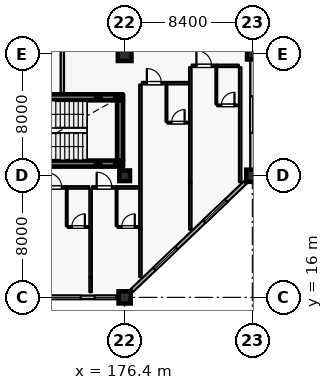
"""IFC4 building model, lengths in metres.
Left out: names, types, materials, properties, quantities, classifications, styles, units other than length and angle.
Written with IfcOpenShell. Run it as: python <this file> out.ifc"""

import sys

from ifc_helpers import new_model, si_unit, direction, frame, frame_2d, origin, origin_2d, place, context, subcontext, project, spatial, rectangle, hollow_rectangle, extrude, element, fill, save


model = new_model("IFC4")
c1 = context("Model", 3, precision=1e-05, world=origin(), true_north=direction((0.0, 1.0)))
c2 = subcontext(c1, "Body", "Model", "MODEL_VIEW")
j1 = project(units=[si_unit("LENGTHUNIT", "METRE"), si_unit("PLANEANGLEUNIT", "RADIAN")], contexts=[c1])
p1 = place(None, origin())
s1 = spatial("IfcSite", under=j1, at=p1, CompositionType="ELEMENT")
p2 = place(p1, origin())
s2 = spatial("IfcBuilding", under=s1, at=p2, CompositionType="ELEMENT")
p3 = place(p2, frame((0.0, 0.0, 16.2)))
s3 = spatial("IfcBuildingStorey", under=s2, at=p3, CompositionType="ELEMENT", Elevation=16.2)
p4 = place(p3, frame((176.4, 16.0, 0.0), z_axis=(0.0, 0.0, 1.0), x_axis=(1.0, 0.0, 0.0)))
e1 = element("IfcColumn", 1, at=p4, inside=s3, PredefinedType="COLUMN", context=c2, shape_type="SweptSolid", body=[
    extrude(rectangle(XDim=0.8, YDim=0.8, at=origin_2d()), origin(), (0.0, 0.0, 1.0), 4.8),
])
p5 = place(p3, frame((176.4, 32.0, 0.0), z_axis=(0.0, 0.0, 1.0), x_axis=(1.0, 0.0, 0.0)))
e2 = element("IfcColumn", 2, at=p5, inside=s3, PredefinedType="COLUMN", context=c2, shape_type="SweptSolid", body=[
    extrude(rectangle(XDim=0.9, YDim=0.9, at=origin_2d()), origin(), (0.0, 0.0, 1.0), 4.8),
])
p6 = place(p3, frame((184.8, 24.0, 0.0), z_axis=(0.0, 0.0, 1.0), x_axis=(1.0, 0.0, 0.0)))
e3 = element("IfcColumn", 3, at=p6, inside=s3, PredefinedType="COLUMN", context=c2, shape_type="SweptSolid", body=[
    extrude(rectangle(XDim=0.8, YDim=0.8, at=origin_2d()), origin(), (0.0, 0.0, 1.0), 4.8),
])
for number, where, z_axis, x_axis in (
    (4, (176.4, 24.0, 0.0), (0.0, 0.0, 1.0), (1.0, 0.0, 0.0)),
    (5, (184.8, 32.0, 0.0), (0.0, 0.0, 1.0), (1.0, 0.0, 0.0)),
):
    element("IfcColumn", number, at=place(p3, frame(where, z_axis=z_axis, x_axis=x_axis)), inside=s3, PredefinedType="COLUMN", context=c2, shape_type="SweptSolid", body=[
        extrude(rectangle(XDim=0.7, YDim=0.7, at=origin_2d()), origin(), (0.0, 0.0, 1.0), 4.8),
    ])
p7 = place(p3, frame((176.0, 16.0, 0.0), z_axis=(0.0, 0.0, 1.0), x_axis=(-1.0, 0.0, 0.0)))
e6 = element("IfcWall", 6, at=p7, inside=s3, PredefinedType="SOLIDWALL", context=c2, shape_type="SweptSolid", body=[
    extrude(rectangle(XDim=7.6, YDim=0.24, at=frame_2d((3.8, 0.0))), origin(), (0.0, 0.0, 1.0), 4.13),
])
p8 = place(p7, frame((0.17, 0.0, 0.8)))
e7 = element("IfcOpeningElement", 7, at=p8, cuts=e6, PredefinedType="OPENING", context=c2, shape_type="SweptSolid", body=[
    extrude(rectangle(XDim=1.4, YDim=1.6, at=frame_2d((0.7, 0.8))), frame((0.0, 0.13, 0.0), z_axis=(0.0, -1.0, 0.0), x_axis=(1.0, 0.0, 0.0)), (0.0, 0.0, 1.0), 0.26),
])
p9 = place(p7, frame((2.48, 0.0, 0.8)))
e8 = element("IfcOpeningElement", 8, at=p9, cuts=e6, PredefinedType="OPENING", context=c2, shape_type="SweptSolid", body=[
    extrude(rectangle(XDim=2.0, YDim=1.75, at=frame_2d((1.0, 0.875))), frame((0.0, 0.13, 0.0), z_axis=(0.0, -1.0, 0.0), x_axis=(1.0, 0.0, 0.0)), (0.0, 0.0, 1.0), 0.26),
])
p10 = place(p7, frame((5.41, 0.0, 0.8)))
e9 = element("IfcOpeningElement", 9, at=p10, cuts=e6, PredefinedType="OPENING", context=c2, shape_type="SweptSolid", body=[
    extrude(rectangle(XDim=2.0, YDim=1.75, at=frame_2d((1.0, 0.875))), frame((0.0, 0.13, 0.0), z_axis=(0.0, -1.0, 0.0), x_axis=(1.0, 0.0, 0.0)), (0.0, 0.0, 1.0), 0.26),
])
p11 = place(p3, frame((184.4, 23.619, 0.0), z_axis=(0.0, 0.0, 1.0), x_axis=(-0.724145676014, -0.689647040094, 0.0)))
e10 = element("IfcWall", 10, at=p11, inside=s3, PredefinedType="SOLIDWALL", context=c2, shape_type="SweptSolid", body=[
    extrude(rectangle(XDim=10.495, YDim=0.24, at=frame_2d((5.248, 0.0))), origin(), (0.0, 0.0, 1.0), 4.13),
])
p12 = place(p11, frame((1.817, 0.0, 0.8)))
e11 = element("IfcOpeningElement", 11, at=p12, cuts=e10, PredefinedType="OPENING", context=c2, shape_type="SweptSolid", body=[
    extrude(rectangle(XDim=2.0, YDim=1.75, at=frame_2d((1.0, 0.875))), frame((0.0, 0.13, 0.0), z_axis=(0.0, -1.0, 0.0), x_axis=(1.0, 0.0, 0.0)), (0.0, 0.0, 1.0), 0.26),
])
p13 = place(p11, frame((6.347, 0.0, 0.8)))
e12 = element("IfcOpeningElement", 12, at=p13, cuts=e10, PredefinedType="OPENING", context=c2, shape_type="SweptSolid", body=[
    extrude(rectangle(XDim=2.0, YDim=1.75, at=frame_2d((1.0, 0.875))), frame((0.0, 0.13, 0.0), z_axis=(0.0, -1.0, 0.0), x_axis=(1.0, 0.0, 0.0)), (0.0, 0.0, 1.0), 0.26),
])
p14 = place(p3, frame((184.8, 31.65, 0.0), z_axis=(0.0, 0.0, 1.0), x_axis=(0.0, -1.0, 0.0)))
e13 = element("IfcWall", 13, at=p14, inside=s3, PredefinedType="SOLIDWALL", context=c2, shape_type="SweptSolid", body=[
    extrude(rectangle(XDim=7.25, YDim=0.28, at=frame_2d((3.625, 0.0))), origin(), (0.0, 0.0, 1.0), 3.9),
])
p15 = place(p14, frame((2.425, 0.0, 0.75)))
e14 = element("IfcOpeningElement", 14, at=p15, cuts=e13, PredefinedType="OPENING", context=c2, shape_type="SweptSolid", body=[
    extrude(rectangle(XDim=2.4, YDim=1.65, at=frame_2d((1.2, 0.825))), frame((0.0, 0.15, 0.0), z_axis=(0.0, -1.0, 0.0), x_axis=(1.0, 0.0, 0.0)), (0.0, 0.0, 1.0), 0.3),
])
p16 = place(p3, frame((168.1, 24.8, 0.0), z_axis=(0.0, 0.0, 1.0), x_axis=(1.0, 0.0, 0.0)))
e15 = element("IfcWall", 15, at=p16, inside=s3, PredefinedType="SHEAR", context=c2, shape_type="SweptSolid", body=[
    extrude(rectangle(XDim=8.2, YDim=0.4, at=frame_2d((4.1, 0.0))), origin(), (0.0, 0.0, 1.0), 4.535),
])
p17 = place(p3, frame((176.1, 25.005, 0.0), z_axis=(0.0, 0.0, 1.0), x_axis=(0.0, 1.0, 0.0)))
e16 = element("IfcWall", 16, at=p17, inside=s3, PredefinedType="SHEAR", context=c2, shape_type="SweptSolid", body=[
    extrude(rectangle(XDim=3.95, YDim=0.4, at=frame_2d((1.975, 0.0))), origin(), (0.0, 0.0, 1.0), 4.535),
])
p18 = place(p3, frame((168.1, 29.16, 0.0), z_axis=(0.0, 0.0, 1.0), x_axis=(1.0, 0.0, 0.0)))
e17 = element("IfcWall", 17, at=p18, inside=s3, PredefinedType="SHEAR", context=c2, shape_type="SweptSolid", body=[
    extrude(rectangle(XDim=8.2, YDim=0.4, at=frame_2d((4.1, 0.0))), origin(), (0.0, 0.0, 1.0), 4.535),
])
p19 = place(p18, frame((0.43, 0.0, 0.0)))
e18 = element("IfcOpeningElement", 18, at=p19, cuts=e17, PredefinedType="OPENING", context=c2, shape_type="SweptSolid", body=[
    extrude(rectangle(XDim=1.16, YDim=2.2, at=frame_2d((0.58, 1.1))), frame((0.0, 0.21, 0.0), z_axis=(0.0, -1.0, 0.0), x_axis=(1.0, 0.0, 0.0)), (0.0, 0.0, 1.0), 0.42),
])
p20 = place(p3, frame((172.3, 29.365, 0.0), z_axis=(0.0, 0.0, 1.0), x_axis=(0.0, 1.0, 0.0)))
e19 = element("IfcWall", 19, at=p20, inside=s3, PredefinedType="PARTITIONING", context=c2, shape_type="SweptSolid", body=[
    extrude(rectangle(XDim=2.92, YDim=0.22, at=frame_2d((1.46, 0.0))), origin(), (0.0, 0.0, 1.0), 4.535),
])
for number, where, z_axis, x_axis in (
    (20, (174.66, 24.8, -2.4), (0.0, 0.0, 1.0), (1.0, 0.0, 0.0)),
    (21, (174.66, 29.16, -2.4), (0.0, 0.0, 1.0), (1.0, 0.0, 0.0)),
    (22, (175.92, 24.8, -2.4), (0.0, 0.0, 1.0), (1.0, 0.0, 0.0)),
    (23, (175.92, 29.16, -2.4), (0.0, 0.0, 1.0), (1.0, 0.0, 0.0)),
):
    element("IfcColumn", number, at=place(p3, frame(where, z_axis=z_axis, x_axis=x_axis)), inside=s3, PredefinedType="COLUMN", context=c2, shape_type="SweptSolid", body=[
        extrude(hollow_rectangle(XDim=0.3, YDim=0.3, WallThickness=0.012, at=origin_2d()), origin(), (0.0, 0.0, 1.0), 4.62),
    ])
p21 = place(p3, frame((170.97, 23.23, 0.0), z_axis=(0.0, 0.0, 1.0), x_axis=(1.0, 0.0, 0.0)))
e24 = element("IfcWall", 24, at=p21, inside=s3, PredefinedType="PARTITIONING", context=c2, shape_type="SweptSolid", body=[
    extrude(rectangle(XDim=1.62, YDim=0.16, at=frame_2d((0.81, 0.0))), origin(), (0.0, 0.0, 1.0), 4.535),
])
p22 = place(p21, frame((0.33, 0.0, 0.0)))
e25 = element("IfcOpeningElement", 25, at=p22, cuts=e24, PredefinedType="OPENING", context=c2, shape_type="SweptSolid", body=[
    extrude(rectangle(XDim=0.96, YDim=2.2, at=frame_2d((0.48, 1.1))), frame((0.0, 0.09, 0.0), z_axis=(0.0, -1.0, 0.0), x_axis=(1.0, 0.0, 0.0)), (0.0, 0.0, 1.0), 0.18),
])
p23 = place(p3, frame((172.6, 23.23, 0.0), z_axis=(0.0, 0.0, 1.0), x_axis=(1.0, 0.0, 0.0)))
e26 = element("IfcWall", 26, at=p23, inside=s3, PredefinedType="PARTITIONING", context=c2, shape_type="SweptSolid", body=[
    extrude(rectangle(XDim=1.47, YDim=0.16, at=frame_2d((0.735, 0.0))), origin(), (0.0, 0.0, 1.0), 4.535),
])
p24 = place(p3, frame((172.59, 20.69, 0.0), z_axis=(0.0, 0.0, 1.0), x_axis=(0.0, 1.0, 0.0)))
e27 = element("IfcWall", 27, at=p24, inside=s3, PredefinedType="PARTITIONING", context=c2, shape_type="SweptSolid", body=[
    extrude(rectangle(XDim=2.45, YDim=0.115, at=frame_2d((1.225, 0.0))), origin(), (0.0, 0.0, 1.0), 4.535),
])
p25 = place(p3, frame((172.65, 20.63, 0.0), z_axis=(0.0, 0.0, 1.0), x_axis=(1.0, 0.0, 0.0)))
e28 = element("IfcWall", 28, at=p25, inside=s3, PredefinedType="PARTITIONING", context=c2, shape_type="SweptSolid", body=[
    extrude(rectangle(XDim=1.41, YDim=0.115, at=frame_2d((0.705, 0.0))), origin(), (0.0, 0.0, 1.0), 4.535),
])
p26 = place(p25, frame((0.275, 0.0, 0.0)))
e29 = element("IfcOpeningElement", 29, at=p26, cuts=e28, PredefinedType="OPENING", context=c2, shape_type="SweptSolid", body=[
    extrude(rectangle(XDim=0.86, YDim=2.12, at=frame_2d((0.43, 1.06))), frame((0.0, 0.067, 0.0), z_axis=(0.0, -1.0, 0.0), x_axis=(1.0, 0.0, 0.0)), (0.0, 0.0, 1.0), 0.135),
])
p27 = place(p3, frame((174.16, 16.34, 0.0), z_axis=(0.0, 0.0, 1.0), x_axis=(0.0, 1.0, 0.0)))
e30 = element("IfcWall", 30, at=p27, inside=s3, PredefinedType="PARTITIONING", context=c2, shape_type="SweptSolid", body=[
    extrude(rectangle(XDim=0.98, YDim=0.16, at=frame_2d((0.49, 0.0))), origin(), (0.0, 0.0, 1.0), 4.535),
])
p28 = place(p3, frame((174.25, 23.23, 0.0), z_axis=(0.0, 0.0, 1.0), x_axis=(1.0, 0.0, 0.0)))
e31 = element("IfcWall", 31, at=p28, inside=s3, PredefinedType="PARTITIONING", context=c2, shape_type="SweptSolid", body=[
    extrude(rectangle(XDim=1.62, YDim=0.16, at=frame_2d((0.81, 0.0))), origin(), (0.0, 0.0, 1.0), 4.535),
])
p29 = place(p28, frame((0.31, 0.0, 0.0)))
e32 = element("IfcOpeningElement", 32, at=p29, cuts=e31, PredefinedType="OPENING", context=c2, shape_type="SweptSolid", body=[
    extrude(rectangle(XDim=1.0, YDim=2.25, at=frame_2d((0.5, 1.125))), frame((0.0, 0.09, 0.0), z_axis=(0.0, -1.0, 0.0), x_axis=(1.0, 0.0, 0.0)), (0.0, 0.0, 1.0), 0.18),
])
p30 = place(p3, frame((175.88, 23.23, 0.0), z_axis=(0.0, 0.0, 1.0), x_axis=(1.0, 0.0, 0.0)))
e33 = element("IfcWall", 33, at=p30, inside=s3, PredefinedType="PARTITIONING", context=c2, shape_type="SweptSolid", body=[
    extrude(rectangle(XDim=1.47, YDim=0.16, at=frame_2d((0.735, 0.0))), origin(), (0.0, 0.0, 1.0), 4.535),
])
p31 = place(p3, frame((175.87, 20.69, 0.0), z_axis=(0.0, 0.0, 1.0), x_axis=(0.0, 1.0, 0.0)))
e34 = element("IfcWall", 34, at=p31, inside=s3, PredefinedType="PARTITIONING", context=c2, shape_type="SweptSolid", body=[
    extrude(rectangle(XDim=2.45, YDim=0.115, at=frame_2d((1.225, 0.0))), origin(), (0.0, 0.0, 1.0), 4.535),
])
p32 = place(p3, frame((175.93, 20.63, 0.0), z_axis=(0.0, 0.0, 1.0), x_axis=(1.0, 0.0, 0.0)))
e35 = element("IfcWall", 35, at=p32, inside=s3, PredefinedType="PARTITIONING", context=c2, shape_type="SweptSolid", body=[
    extrude(rectangle(XDim=1.41, YDim=0.115, at=frame_2d((0.705, 0.0))), origin(), (0.0, 0.0, 1.0), 4.535),
])
p33 = place(p32, frame((0.275, 0.0, 0.0)))
e36 = element("IfcOpeningElement", 36, at=p33, cuts=e35, PredefinedType="OPENING", context=c2, shape_type="SweptSolid", body=[
    extrude(rectangle(XDim=0.86, YDim=2.12, at=frame_2d((0.43, 1.06))), frame((0.0, 0.067, 0.0), z_axis=(0.0, -1.0, 0.0), x_axis=(1.0, 0.0, 0.0)), (0.0, 0.0, 1.0), 0.135),
])
p34 = place(p3, frame((174.16, 17.33, 0.0), z_axis=(0.0, 0.0, 1.0), x_axis=(0.0, 1.0, 0.0)))
e37 = element("IfcWall", 37, at=p34, inside=s3, PredefinedType="PARTITIONING", context=c2, shape_type="SweptSolid", body=[
    extrude(rectangle(XDim=5.81, YDim=0.16, at=frame_2d((2.905, 0.0))), origin(), (0.0, 0.0, 1.0), 4.535),
])
p35 = place(p3, frame((177.44, 17.33, 0.0), z_axis=(0.0, 0.0, 1.0), x_axis=(0.0, 1.0, 0.0)))
e38 = element("IfcWall", 38, at=p35, inside=s3, PredefinedType="PARTITIONING", context=c2, shape_type="SweptSolid", body=[
    extrude(rectangle(XDim=3.11, YDim=0.16, at=frame_2d((1.555, 0.0))), origin(), (0.0, 0.0, 1.0), 4.535),
])
p36 = place(p3, frame((177.53, 30.09, 0.0), z_axis=(0.0, 0.0, 1.0), x_axis=(1.0, 0.0, 0.0)))
e39 = element("IfcWall", 39, at=p36, inside=s3, PredefinedType="PARTITIONING", context=c2, shape_type="SweptSolid", body=[
    extrude(rectangle(XDim=1.62, YDim=0.16, at=frame_2d((0.81, 0.0))), origin(), (0.0, 0.0, 1.0), 4.535),
])
p37 = place(p36, frame((0.33, 0.0, 0.0)))
e40 = element("IfcOpeningElement", 40, at=p37, cuts=e39, PredefinedType="OPENING", context=c2, shape_type="SweptSolid", body=[
    extrude(rectangle(XDim=0.96, YDim=2.2, at=frame_2d((0.48, 1.1))), frame((0.0, 0.09, 0.0), z_axis=(0.0, -1.0, 0.0), x_axis=(1.0, 0.0, 0.0)), (0.0, 0.0, 1.0), 0.18),
])
p38 = place(p3, frame((179.16, 30.09, 0.0), z_axis=(0.0, 0.0, 1.0), x_axis=(1.0, 0.0, 0.0)))
e41 = element("IfcWall", 41, at=p38, inside=s3, PredefinedType="PARTITIONING", context=c2, shape_type="SweptSolid", body=[
    extrude(rectangle(XDim=1.47, YDim=0.16, at=frame_2d((0.735, 0.0))), origin(), (0.0, 0.0, 1.0), 4.535),
])
p39 = place(p3, frame((179.15, 27.55, 0.0), z_axis=(0.0, 0.0, 1.0), x_axis=(0.0, 1.0, 0.0)))
e42 = element("IfcWall", 42, at=p39, inside=s3, PredefinedType="PARTITIONING", context=c2, shape_type="SweptSolid", body=[
    extrude(rectangle(XDim=2.45, YDim=0.115, at=frame_2d((1.225, 0.0))), origin(), (0.0, 0.0, 1.0), 4.535),
])
p40 = place(p3, frame((179.21, 27.49, 0.0), z_axis=(0.0, 0.0, 1.0), x_axis=(1.0, 0.0, 0.0)))
e43 = element("IfcWall", 43, at=p40, inside=s3, PredefinedType="PARTITIONING", context=c2, shape_type="SweptSolid", body=[
    extrude(rectangle(XDim=1.41, YDim=0.115, at=frame_2d((0.705, 0.0))), origin(), (0.0, 0.0, 1.0), 4.535),
])
p41 = place(p40, frame((0.275, 0.0, 0.0)))
e44 = element("IfcOpeningElement", 44, at=p41, cuts=e43, PredefinedType="OPENING", context=c2, shape_type="SweptSolid", body=[
    extrude(rectangle(XDim=0.86, YDim=2.12, at=frame_2d((0.43, 1.06))), frame((0.0, 0.067, 0.0), z_axis=(0.0, -1.0, 0.0), x_axis=(1.0, 0.0, 0.0)), (0.0, 0.0, 1.0), 0.135),
])
p42 = place(p3, frame((177.44, 20.45, 0.0), z_axis=(0.0, 0.0, 1.0), x_axis=(0.0, 1.0, 0.0)))
e45 = element("IfcWall", 45, at=p42, inside=s3, PredefinedType="PARTITIONING", context=c2, shape_type="SweptSolid", body=[
    extrude(rectangle(XDim=9.55, YDim=0.16, at=frame_2d((4.775, 0.0))), origin(), (0.0, 0.0, 1.0), 4.535),
])
p43 = place(p3, frame((180.72, 20.45, 0.0), z_axis=(0.0, 0.0, 1.0), x_axis=(0.0, 1.0, 0.0)))
e46 = element("IfcWall", 46, at=p43, inside=s3, PredefinedType="PARTITIONING", context=c2, shape_type="SweptSolid", body=[
    extrude(rectangle(XDim=3.12, YDim=0.16, at=frame_2d((1.56, 0.0))), origin(), (0.0, 0.0, 1.0), 4.535),
])
p44 = place(p3, frame((180.81, 31.23, 0.0), z_axis=(0.0, 0.0, 1.0), x_axis=(1.0, 0.0, 0.0)))
e47 = element("IfcWall", 47, at=p44, inside=s3, PredefinedType="PARTITIONING", context=c2, shape_type="SweptSolid", body=[
    extrude(rectangle(XDim=1.62, YDim=0.16, at=frame_2d((0.81, 0.0))), origin(), (0.0, 0.0, 1.0), 4.535),
])
p45 = place(p44, frame((0.31, 0.0, 0.0)))
e48 = element("IfcOpeningElement", 48, at=p45, cuts=e47, PredefinedType="OPENING", context=c2, shape_type="SweptSolid", body=[
    extrude(rectangle(XDim=1.0, YDim=2.25, at=frame_2d((0.5, 1.125))), frame((0.0, 0.09, 0.0), z_axis=(0.0, -1.0, 0.0), x_axis=(1.0, 0.0, 0.0)), (0.0, 0.0, 1.0), 0.18),
])
p46 = place(p3, frame((182.44, 31.23, 0.0), z_axis=(0.0, 0.0, 1.0), x_axis=(1.0, 0.0, 0.0)))
e49 = element("IfcWall", 49, at=p46, inside=s3, PredefinedType="PARTITIONING", context=c2, shape_type="SweptSolid", body=[
    extrude(rectangle(XDim=1.47, YDim=0.16, at=frame_2d((0.735, 0.0))), origin(), (0.0, 0.0, 1.0), 4.535),
])
p47 = place(p3, frame((182.43, 28.69, 0.0), z_axis=(0.0, 0.0, 1.0), x_axis=(0.0, 1.0, 0.0)))
e50 = element("IfcWall", 50, at=p47, inside=s3, PredefinedType="PARTITIONING", context=c2, shape_type="SweptSolid", body=[
    extrude(rectangle(XDim=2.45, YDim=0.115, at=frame_2d((1.225, 0.0))), origin(), (0.0, 0.0, 1.0), 4.535),
])
p48 = place(p3, frame((182.49, 28.63, 0.0), z_axis=(0.0, 0.0, 1.0), x_axis=(1.0, 0.0, 0.0)))
e51 = element("IfcWall", 51, at=p48, inside=s3, PredefinedType="PARTITIONING", context=c2, shape_type="SweptSolid", body=[
    extrude(rectangle(XDim=1.41, YDim=0.115, at=frame_2d((0.705, 0.0))), origin(), (0.0, 0.0, 1.0), 4.535),
])
p49 = place(p48, frame((0.275, 0.0, 0.0)))
e52 = element("IfcOpeningElement", 52, at=p49, cuts=e51, PredefinedType="OPENING", context=c2, shape_type="SweptSolid", body=[
    extrude(rectangle(XDim=0.86, YDim=2.12, at=frame_2d((0.43, 1.06))), frame((0.0, 0.067, 0.0), z_axis=(0.0, -1.0, 0.0), x_axis=(1.0, 0.0, 0.0)), (0.0, 0.0, 1.0), 0.135),
])
for number, where, z_axis, x_axis in (
    (53, (180.72, 23.58, 0.0), (0.0, 0.0, 1.0), (0.0, 1.0, 0.0)),
    (54, (184.0, 23.58, 0.0), (0.0, 0.0, 1.0), (0.0, 1.0, 0.0)),
):
    element("IfcWall", number, at=place(p3, frame(where, z_axis=z_axis, x_axis=x_axis)), inside=s3, PredefinedType="PARTITIONING", context=c2, shape_type="SweptSolid", body=[
        extrude(rectangle(XDim=7.56, YDim=0.16, at=frame_2d((3.78, 0.0))), origin(), (0.0, 0.0, 1.0), 4.535),
    ])
p50 = place(p8, origin())
e55 = element("IfcWindow", 55, at=p50, inside=s3, PartitioningType="SINGLE_PANEL", PredefinedType="WINDOW", context=c2, shape_type="SweptSolid", body=[
    extrude(rectangle(XDim=1.4, YDim=1.6, at=frame_2d((0.7, 0.8))), frame((0.0, 0.03, 0.0), z_axis=(0.0, -1.0, 0.0), x_axis=(1.0, 0.0, 0.0)), (0.0, 0.0, 1.0), 0.06),
])
fill(e7, e55)
p51 = place(p9, origin())
e56 = element("IfcWindow", 56, at=p51, inside=s3, PartitioningType="DOUBLE_PANEL_VERTICAL", PredefinedType="WINDOW", context=c2, shape_type="SweptSolid", body=[
    extrude(rectangle(XDim=2.0, YDim=1.75, at=frame_2d((1.0, 0.875))), frame((0.0, 0.03, 0.0), z_axis=(0.0, -1.0, 0.0), x_axis=(1.0, 0.0, 0.0)), (0.0, 0.0, 1.0), 0.06),
])
fill(e8, e56)
p52 = place(p12, origin())
e57 = element("IfcWindow", 57, at=p52, inside=s3, PartitioningType="DOUBLE_PANEL_VERTICAL", PredefinedType="WINDOW", context=c2, shape_type="SweptSolid", body=[
    extrude(rectangle(XDim=2.0, YDim=1.75, at=frame_2d((1.0, 0.875))), frame((0.0, 0.03, 0.0), z_axis=(0.0, -1.0, 0.0), x_axis=(1.0, 0.0, 0.0)), (0.0, 0.0, 1.0), 0.06),
])
fill(e11, e57)
p53 = place(p13, origin())
e58 = element("IfcWindow", 58, at=p53, inside=s3, PartitioningType="DOUBLE_PANEL_VERTICAL", PredefinedType="WINDOW", context=c2, shape_type="SweptSolid", body=[
    extrude(rectangle(XDim=2.0, YDim=1.75, at=frame_2d((1.0, 0.875))), frame((0.0, 0.03, 0.0), z_axis=(0.0, -1.0, 0.0), x_axis=(1.0, 0.0, 0.0)), (0.0, 0.0, 1.0), 0.06),
])
fill(e12, e58)
p54 = place(p15, origin())
e59 = element("IfcWindow", 59, at=p54, inside=s3, PartitioningType="DOUBLE_PANEL_VERTICAL", PredefinedType="WINDOW", context=c2, shape_type="SweptSolid", body=[
    extrude(rectangle(XDim=2.4, YDim=1.65, at=frame_2d((1.2, 0.825))), frame((0.0, 0.03, 0.0), z_axis=(0.0, -1.0, 0.0), x_axis=(1.0, 0.0, 0.0)), (0.0, 0.0, 1.0), 0.06),
])
fill(e14, e59)
p55 = place(p22, origin())
e60 = element("IfcDoor", 60, at=p55, inside=s3, OperationType="SINGLE_SWING_LEFT", PredefinedType="DOOR", context=c2, shape_type="SweptSolid", body=[
    extrude(rectangle(XDim=0.96, YDim=2.2, at=frame_2d((0.48, 1.1))), frame((0.0, 0.025, 0.0), z_axis=(0.0, -1.0, 0.0), x_axis=(1.0, 0.0, 0.0)), (0.0, 0.0, 1.0), 0.05),
])
fill(e25, e60)
p56 = place(p26, origin())
e61 = element("IfcDoor", 61, at=p56, inside=s3, OperationType="SINGLE_SWING_RIGHT", PredefinedType="DOOR", context=c2, shape_type="SweptSolid", body=[
    extrude(rectangle(XDim=0.86, YDim=2.12, at=frame_2d((0.43, 1.06))), frame((0.0, 0.025, 0.0), z_axis=(0.0, -1.0, 0.0), x_axis=(1.0, 0.0, 0.0)), (0.0, 0.0, 1.0), 0.05),
])
fill(e29, e61)
p57 = place(p29, origin())
e62 = element("IfcDoor", 62, at=p57, inside=s3, OperationType="SINGLE_SWING_LEFT", PredefinedType="DOOR", context=c2, shape_type="SweptSolid", body=[
    extrude(rectangle(XDim=1.0, YDim=2.25, at=frame_2d((0.5, 1.125))), frame((0.0, 0.025, 0.0), z_axis=(0.0, -1.0, 0.0), x_axis=(1.0, 0.0, 0.0)), (0.0, 0.0, 1.0), 0.05),
])
fill(e32, e62)
p58 = place(p33, origin())
e63 = element("IfcDoor", 63, at=p58, inside=s3, OperationType="SINGLE_SWING_RIGHT", PredefinedType="DOOR", context=c2, shape_type="SweptSolid", body=[
    extrude(rectangle(XDim=0.86, YDim=2.12, at=frame_2d((0.43, 1.06))), frame((0.0, 0.025, 0.0), z_axis=(0.0, -1.0, 0.0), x_axis=(1.0, 0.0, 0.0)), (0.0, 0.0, 1.0), 0.05),
])
fill(e36, e63)
p59 = place(p37, origin())
e64 = element("IfcDoor", 64, at=p59, inside=s3, OperationType="SINGLE_SWING_LEFT", PredefinedType="DOOR", context=c2, shape_type="SweptSolid", body=[
    extrude(rectangle(XDim=0.96, YDim=2.2, at=frame_2d((0.48, 1.1))), frame((0.0, 0.025, 0.0), z_axis=(0.0, -1.0, 0.0), x_axis=(1.0, 0.0, 0.0)), (0.0, 0.0, 1.0), 0.05),
])
fill(e40, e64)
p60 = place(p41, origin())
e65 = element("IfcDoor", 65, at=p60, inside=s3, OperationType="SINGLE_SWING_RIGHT", PredefinedType="DOOR", context=c2, shape_type="SweptSolid", body=[
    extrude(rectangle(XDim=0.86, YDim=2.12, at=frame_2d((0.43, 1.06))), frame((0.0, 0.025, 0.0), z_axis=(0.0, -1.0, 0.0), x_axis=(1.0, 0.0, 0.0)), (0.0, 0.0, 1.0), 0.05),
])
fill(e44, e65)
p61 = place(p45, origin())
e66 = element("IfcDoor", 66, at=p61, inside=s3, OperationType="SINGLE_SWING_LEFT", PredefinedType="DOOR", context=c2, shape_type="SweptSolid", body=[
    extrude(rectangle(XDim=1.0, YDim=2.25, at=frame_2d((0.5, 1.125))), frame((0.0, 0.025, 0.0), z_axis=(0.0, -1.0, 0.0), x_axis=(1.0, 0.0, 0.0)), (0.0, 0.0, 1.0), 0.05),
])
fill(e48, e66)
p62 = place(p49, origin())
e67 = element("IfcDoor", 67, at=p62, inside=s3, OperationType="SINGLE_SWING_RIGHT", PredefinedType="DOOR", context=c2, shape_type="SweptSolid", body=[
    extrude(rectangle(XDim=0.86, YDim=2.12, at=frame_2d((0.43, 1.06))), frame((0.0, 0.025, 0.0), z_axis=(0.0, -1.0, 0.0), x_axis=(1.0, 0.0, 0.0)), (0.0, 0.0, 1.0), 0.05),
])
fill(e52, e67)
save(model, sys.argv[1])
